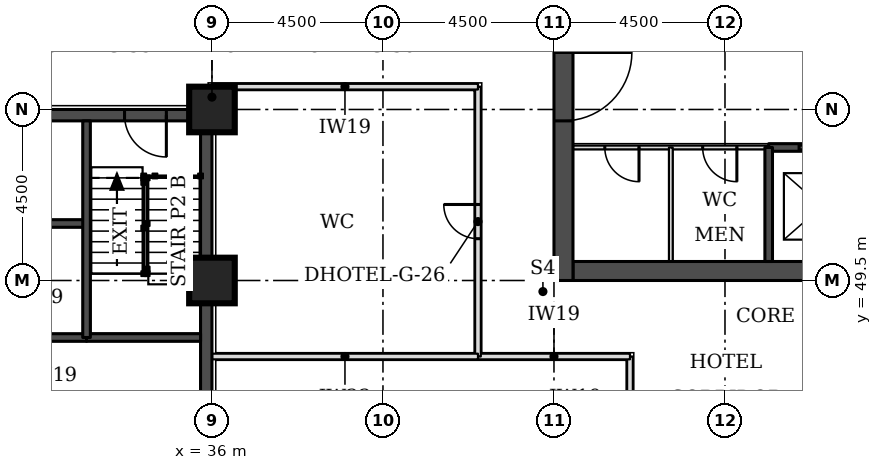
"""IFC4 building model, lengths in metres.
Left out: names, types, materials, properties, quantities, classifications, styles, units other than length and angle.
Written with IfcOpenShell. Run it as: python <this file> out.ifc"""

import sys

from ifc_helpers import new_model, si_unit, direction, frame, frame_2d, origin, origin_2d, place, context, subcontext, project, spatial, rectangle, extrude, element, fill, save


model = new_model("IFC4")
c1 = context("Model", 3, precision=1e-05, world=origin(), true_north=direction((0.0, 1.0)))
c2 = subcontext(c1, "Body", "Model", "MODEL_VIEW")
j1 = project(units=[si_unit("LENGTHUNIT", "METRE"), si_unit("PLANEANGLEUNIT", "RADIAN")], contexts=[c1])
p1 = place(None, origin())
s1 = spatial("IfcSite", under=j1, at=p1, CompositionType="ELEMENT")
p2 = place(p1, origin())
s2 = spatial("IfcBuilding", under=s1, at=p2, CompositionType="ELEMENT")
p3 = place(p2, frame((0.0, 0.0, 66.0)))
s3 = spatial("IfcBuildingStorey", under=s2, at=p3, CompositionType="ELEMENT", Elevation=66.0)
for number, where, z_axis, x_axis in (
    (1, (36.0, 49.5, 0.0), (0.0, 0.0, 1.0), (1.0, 0.0, 0.0)),
    (2, (36.0, 54.0, 0.0), (0.0, 0.0, 1.0), (1.0, 0.0, 0.0)),
):
    element("IfcColumn", number, at=place(p3, frame(where, z_axis=z_axis, x_axis=x_axis)), inside=s3, PredefinedType="COLUMN", context=c2, shape_type="SweptSolid", body=[
        extrude(rectangle(XDim=1.2, YDim=1.2, at=origin_2d()), origin(), (0.0, 0.0, 1.0), 3.3),
    ])
p4 = place(p3, frame((45.5, 49.75, 0.0), z_axis=(0.0, 0.0, 1.0), x_axis=(1.0, 0.0, 0.0)))
e3 = element("IfcWall", 3, at=p4, inside=s3, PredefinedType="SHEAR", context=c2, shape_type="SweptSolid", body=[
    extrude(rectangle(XDim=21.5, YDim=0.5, at=frame_2d((10.75, 0.0))), origin(), (0.0, 0.0, 1.0), 3.3),
])
p5 = place(p3, frame((45.25, 49.5, 0.0), z_axis=(0.0, 0.0, 1.0), x_axis=(0.0, 1.0, 0.0)))
e4 = element("IfcWall", 4, at=p5, inside=s3, PredefinedType="SHEAR", context=c2, shape_type="SweptSolid", body=[
    extrude(rectangle(XDim=22.5, YDim=0.5, at=frame_2d((11.25, 0.0))), origin(), (0.0, 0.0, 1.0), 3.3),
])
p6 = place(p5, frame((4.2, 0.0, 0.0)))
e5 = element("IfcOpeningElement", 5, at=p6, cuts=e4, PredefinedType="OPENING", context=c2, shape_type="SweptSolid", body=[
    extrude(rectangle(XDim=1.8, YDim=2.1, at=frame_2d((0.9, 1.05))), frame((0.0, 0.26, 0.0), z_axis=(0.0, -1.0, 0.0), x_axis=(1.0, 0.0, 0.0)), (0.0, 0.0, 1.0), 0.52),
])
p7 = place(p5, frame((6.9, 0.0, 0.0)))
e6 = element("IfcOpeningElement", 6, at=p7, cuts=e4, PredefinedType="OPENING", context=c2, shape_type="SweptSolid", body=[
    extrude(rectangle(XDim=1.1, YDim=2.1, at=frame_2d((0.55, 1.05))), frame((0.0, 0.26, 0.0), z_axis=(0.0, -1.0, 0.0), x_axis=(1.0, 0.0, 0.0)), (0.0, 0.0, 1.0), 0.52),
])
p8 = place(p5, frame((13.6, 0.0, 0.0)))
e7 = element("IfcOpeningElement", 7, at=p8, cuts=e4, PredefinedType="OPENING", context=c2, shape_type="SweptSolid", body=[
    extrude(rectangle(XDim=1.1, YDim=2.1, at=frame_2d((0.55, 1.05))), frame((0.0, 0.26, 0.0), z_axis=(0.0, -1.0, 0.0), x_axis=(1.0, 0.0, 0.0)), (0.0, 0.0, 1.0), 0.52),
])
p9 = place(p5, frame((16.5, 0.0, 0.0)))
e8 = element("IfcOpeningElement", 8, at=p9, cuts=e4, PredefinedType="OPENING", context=c2, shape_type="SweptSolid", body=[
    extrude(rectangle(XDim=1.8, YDim=2.1, at=frame_2d((0.9, 1.05))), frame((0.0, 0.26, 0.0), z_axis=(0.0, -1.0, 0.0), x_axis=(1.0, 0.0, 0.0)), (0.0, 0.0, 1.0), 0.52),
])
p10 = place(p3, frame((27.3, 53.85, 0.0), z_axis=(0.0, 0.0, 1.0), x_axis=(1.0, 0.0, 0.0)))
e9 = element("IfcWall", 9, at=p10, inside=s3, PredefinedType="SHEAR", context=c2, shape_type="SweptSolid", body=[
    extrude(rectangle(XDim=8.4, YDim=0.3, at=frame_2d((4.2, 0.0))), origin(), (0.0, 0.0, 1.0), 3.3),
])
p11 = place(p10, frame((6.4, 0.0, 0.0)))
e10 = element("IfcOpeningElement", 10, at=p11, cuts=e9, PredefinedType="OPENING", context=c2, shape_type="SweptSolid", body=[
    extrude(rectangle(XDim=1.1, YDim=2.1, at=frame_2d((0.55, 1.05))), frame((0.0, 0.16, 0.0), z_axis=(0.0, -1.0, 0.0), x_axis=(1.0, 0.0, 0.0)), (0.0, 0.0, 1.0), 0.32),
])
p12 = place(p3, frame((35.85, 45.0, 0.0), z_axis=(0.0, 0.0, 1.0), x_axis=(0.0, 1.0, 0.0)))
e11 = element("IfcWall", 11, at=p12, inside=s3, PredefinedType="SHEAR", context=c2, shape_type="SweptSolid", body=[
    extrude(rectangle(XDim=9.0, YDim=0.3, at=frame_2d((4.5, 0.0))), origin(), (0.0, 0.0, 1.0), 3.3),
])
p13 = place(p3, frame((47.0, 40.5, 0.0), z_axis=(0.0, 0.0, 1.0), x_axis=(0.0, 1.0, 0.0)))
e12 = element("IfcWall", 12, at=p13, inside=s3, PredefinedType="PARTITIONING", context=c2, shape_type="SweptSolid", body=[
    extrude(rectangle(XDim=7.0, YDim=0.15, at=frame_2d((3.5, 0.0))), origin(), (0.0, 0.0, 1.0), 3.08),
])
p14 = place(p13, frame((3.05, 0.0, 0.0)))
e13 = element("IfcOpeningElement", 13, at=p14, cuts=e12, PredefinedType="OPENING", context=c2, shape_type="SweptSolid", body=[
    extrude(rectangle(XDim=0.9, YDim=2.1, at=frame_2d((0.45, 1.05))), frame((0.0, 0.085, 0.0), z_axis=(0.0, -1.0, 0.0), x_axis=(1.0, 0.0, 0.0)), (0.0, 0.0, 1.0), 0.17),
])
p15 = place(p3, frame((43.0, 47.5, 0.0), z_axis=(0.0, 0.0, 1.0), x_axis=(1.0, 0.0, 0.0)))
e14 = element("IfcWall", 14, at=p15, inside=s3, PredefinedType="PARTITIONING", context=c2, shape_type="SweptSolid", body=[
    extrude(rectangle(XDim=4.0, YDim=0.15, at=frame_2d((2.0, 0.0))), origin(), (0.0, 0.0, 1.0), 3.08),
])
p16 = place(p3, frame((43.0, 47.5, 0.0), z_axis=(0.0, 0.0, 1.0), x_axis=(0.0, 1.0, 0.0)))
e15 = element("IfcWall", 15, at=p16, inside=s3, PredefinedType="PARTITIONING", context=c2, shape_type="SweptSolid", body=[
    extrude(rectangle(XDim=7.1, YDim=0.15, at=frame_2d((3.55, 0.0))), origin(), (0.0, 0.0, 1.0), 3.08),
])
p17 = place(p16, frame((3.1, 0.0, 0.0)))
e16 = element("IfcOpeningElement", 16, at=p17, cuts=e15, PredefinedType="OPENING", context=c2, shape_type="SweptSolid", body=[
    extrude(rectangle(XDim=0.9, YDim=2.1, at=frame_2d((0.45, 1.05))), frame((0.0, 0.085, 0.0), z_axis=(0.0, -1.0, 0.0), x_axis=(1.0, 0.0, 0.0)), (0.0, 0.0, 1.0), 0.17),
])
p18 = place(p3, frame((36.0, 54.05, 0.0), z_axis=(0.0, 0.0, 1.0), x_axis=(0.0, 1.0, 0.0)))
e17 = element("IfcWall", 17, at=p18, inside=s3, PredefinedType="PARTITIONING", context=c2, shape_type="SweptSolid", body=[
    extrude(rectangle(XDim=0.55, YDim=0.15, at=frame_2d((0.275, 0.0))), origin(), (0.0, 0.0, 1.0), 3.08),
])
for number, where, z_axis, x_axis in (
    (18, (36.0, 54.6, 0.0), (0.0, 0.0, 1.0), (1.0, 0.0, 0.0)),
    (19, (36.0, 47.5, 0.0), (0.0, 0.0, 1.0), (1.0, 0.0, 0.0)),
):
    element("IfcWall", number, at=place(p3, frame(where, z_axis=z_axis, x_axis=x_axis)), inside=s3, PredefinedType="PARTITIONING", context=c2, shape_type="SweptSolid", body=[
        extrude(rectangle(XDim=7.0, YDim=0.15, at=frame_2d((3.5, 0.0))), origin(), (0.0, 0.0, 1.0), 3.08),
    ])
p19 = place(p3, frame((45.5, 53.0, 0.0), z_axis=(0.0, 0.0, 1.0), x_axis=(1.0, 0.0, 0.0)))
e20 = element("IfcWall", 20, at=p19, inside=s3, PredefinedType="PARTITIONING", context=c2, shape_type="SweptSolid", body=[
    extrude(rectangle(XDim=5.15, YDim=0.1, at=frame_2d((2.575, 0.0))), origin(), (0.0, 0.0, 1.0), 3.08),
])
p20 = place(p19, frame((0.837, 0.0, 0.0)))
e21 = element("IfcOpeningElement", 21, at=p20, cuts=e20, PredefinedType="OPENING", context=c2, shape_type="SweptSolid", body=[
    extrude(rectangle(XDim=0.9, YDim=2.1, at=frame_2d((0.45, 1.05))), frame((0.0, 0.06, 0.0), z_axis=(0.0, -1.0, 0.0), x_axis=(1.0, 0.0, 0.0)), (0.0, 0.0, 1.0), 0.12),
])
p21 = place(p19, frame((3.413, 0.0, 0.0)))
e22 = element("IfcOpeningElement", 22, at=p21, cuts=e20, PredefinedType="OPENING", context=c2, shape_type="SweptSolid", body=[
    extrude(rectangle(XDim=0.9, YDim=2.1, at=frame_2d((0.45, 1.05))), frame((0.0, 0.06, 0.0), z_axis=(0.0, -1.0, 0.0), x_axis=(1.0, 0.0, 0.0)), (0.0, 0.0, 1.0), 0.12),
])
p22 = place(p3, frame((50.65, 53.0, 0.0), z_axis=(0.0, 0.0, 1.0), x_axis=(1.0, 0.0, 0.0)))
e23 = element("IfcWall", 23, at=p22, inside=s3, PredefinedType="SOLIDWALL", context=c2, shape_type="SweptSolid", body=[
    extrude(rectangle(XDim=11.2, YDim=0.2, at=frame_2d((5.6, 0.0))), origin(), (0.0, 0.0, 1.0), 3.08),
])
p23 = place(p22, frame((0.8, 0.0, 0.0)))
e24 = element("IfcOpeningElement", 24, at=p23, cuts=e23, PredefinedType="OPENING", context=c2, shape_type="SweptSolid", body=[
    extrude(rectangle(XDim=1.2, YDim=2.1, at=frame_2d((0.6, 1.05))), frame((0.0, 0.11, 0.0), z_axis=(0.0, -1.0, 0.0), x_axis=(1.0, 0.0, 0.0)), (0.0, 0.0, 1.0), 0.22),
])
p24 = place(p22, frame((3.6, 0.0, 0.0)))
e25 = element("IfcOpeningElement", 25, at=p24, cuts=e23, PredefinedType="OPENING", context=c2, shape_type="SweptSolid", body=[
    extrude(rectangle(XDim=1.2, YDim=2.1, at=frame_2d((0.6, 1.05))), frame((0.0, 0.11, 0.0), z_axis=(0.0, -1.0, 0.0), x_axis=(1.0, 0.0, 0.0)), (0.0, 0.0, 1.0), 0.22),
])
p25 = place(p22, frame((6.4, 0.0, 0.0)))
e26 = element("IfcOpeningElement", 26, at=p25, cuts=e23, PredefinedType="OPENING", context=c2, shape_type="SweptSolid", body=[
    extrude(rectangle(XDim=1.2, YDim=2.1, at=frame_2d((0.6, 1.05))), frame((0.0, 0.11, 0.0), z_axis=(0.0, -1.0, 0.0), x_axis=(1.0, 0.0, 0.0)), (0.0, 0.0, 1.0), 0.22),
])
p26 = place(p22, frame((9.2, 0.0, 0.0)))
e27 = element("IfcOpeningElement", 27, at=p26, cuts=e23, PredefinedType="OPENING", context=c2, shape_type="SweptSolid", body=[
    extrude(rectangle(XDim=1.2, YDim=2.1, at=frame_2d((0.6, 1.05))), frame((0.0, 0.11, 0.0), z_axis=(0.0, -1.0, 0.0), x_axis=(1.0, 0.0, 0.0)), (0.0, 0.0, 1.0), 0.22),
])
p27 = place(p3, frame((48.075, 50.0, 0.0), z_axis=(0.0, 0.0, 1.0), x_axis=(0.0, 1.0, 0.0)))
e28 = element("IfcWall", 28, at=p27, inside=s3, PredefinedType="PARTITIONING", context=c2, shape_type="SweptSolid", body=[
    extrude(rectangle(XDim=3.0, YDim=0.1, at=frame_2d((1.5, 0.0))), origin(), (0.0, 0.0, 1.0), 3.08),
])
p28 = place(p3, frame((50.65, 50.0, 0.0), z_axis=(0.0, 0.0, 1.0), x_axis=(0.0, 1.0, 0.0)))
e29 = element("IfcWall", 29, at=p28, inside=s3, PredefinedType="SOLIDWALL", context=c2, shape_type="SweptSolid", body=[
    extrude(rectangle(XDim=3.0, YDim=0.2, at=frame_2d((1.5, 0.0))), origin(), (0.0, 0.0, 1.0), 3.08),
])
p29 = place(p3, frame((30.3, 48.0, 0.0), z_axis=(0.0, 0.0, 1.0), x_axis=(1.0, 0.0, 0.0)))
e30 = element("IfcWall", 30, at=p29, inside=s3, PredefinedType="SOLIDWALL", context=c2, shape_type="SweptSolid", body=[
    extrude(rectangle(XDim=2.4, YDim=0.2, at=frame_2d((1.2, 0.0))), origin(), (0.0, 0.0, 1.0), 3.08),
])
p30 = place(p3, frame((32.7, 48.0, 0.0), z_axis=(0.0, 0.0, 1.0), x_axis=(1.0, 0.0, 0.0)))
e31 = element("IfcWall", 31, at=p30, inside=s3, PredefinedType="SOLIDWALL", context=c2, shape_type="SweptSolid", body=[
    extrude(rectangle(XDim=3.0, YDim=0.2, at=frame_2d((1.5, 0.0))), origin(), (0.0, 0.0, 1.0), 3.08),
])
p31 = place(p3, frame((30.3, 51.0, 0.0), z_axis=(0.0, 0.0, 1.0), x_axis=(1.0, 0.0, 0.0)))
e32 = element("IfcWall", 32, at=p31, inside=s3, PredefinedType="SOLIDWALL", context=c2, shape_type="SweptSolid", body=[
    extrude(rectangle(XDim=2.4, YDim=0.2, at=frame_2d((1.2, 0.0))), origin(), (0.0, 0.0, 1.0), 3.3),
])
p32 = place(p3, frame((32.7, 48.0, 0.0), z_axis=(0.0, 0.0, 1.0), x_axis=(0.0, 1.0, 0.0)))
e33 = element("IfcWall", 33, at=p32, inside=s3, PredefinedType="SOLIDWALL", context=c2, shape_type="SweptSolid", body=[
    extrude(rectangle(XDim=5.7, YDim=0.2, at=frame_2d((2.85, 0.0))), origin(), (0.0, 0.0, 1.0), 3.08),
])
p33 = place(p17, origin())
e34 = element("IfcDoor", 34, at=p33, inside=s3, OperationType="SINGLE_SWING_RIGHT", PredefinedType="DOOR", context=c2, shape_type="SweptSolid", body=[
    extrude(rectangle(XDim=0.9, YDim=2.1, at=frame_2d((0.45, 1.05))), frame((0.0, 0.025, 0.0), z_axis=(0.0, -1.0, 0.0), x_axis=(1.0, 0.0, 0.0)), (0.0, 0.0, 1.0), 0.05),
])
fill(e16, e34)
p34 = place(p23, origin())
e35 = element("IfcDoor", 35, at=p34, inside=s3, OperationType="DOUBLE_DOOR_SLIDING", PredefinedType="DOOR", context=c2, shape_type="SweptSolid", body=[
    extrude(rectangle(XDim=1.2, YDim=2.1, at=frame_2d((0.6, 1.05))), frame((0.0, 0.025, 0.0), z_axis=(0.0, -1.0, 0.0), x_axis=(1.0, 0.0, 0.0)), (0.0, 0.0, 1.0), 0.05),
])
fill(e24, e35)
p35 = place(p6, frame((1.8, 0.0, 0.0), z_axis=(0.0, 0.0, 1.0), x_axis=(-1.0, 0.0, 0.0)))
e36 = element("IfcDoor", 36, at=p35, inside=s3, OperationType="SINGLE_SWING_LEFT", PredefinedType="DOOR", context=c2, shape_type="SweptSolid", body=[
    extrude(rectangle(XDim=1.8, YDim=2.1, at=frame_2d((0.9, 1.05))), frame((0.0, 0.025, 0.0), z_axis=(0.0, -1.0, 0.0), x_axis=(1.0, 0.0, 0.0)), (0.0, 0.0, 1.0), 0.05),
])
fill(e5, e36)
p36 = place(p20, frame((0.9, 0.0, 0.0), z_axis=(0.0, 0.0, 1.0), x_axis=(-1.0, 0.0, 0.0)))
e37 = element("IfcDoor", 37, at=p36, inside=s3, OperationType="SINGLE_SWING_LEFT", PredefinedType="DOOR", context=c2, shape_type="SweptSolid", body=[
    extrude(rectangle(XDim=0.9, YDim=2.1, at=frame_2d((0.45, 1.05))), frame((0.0, 0.025, 0.0), z_axis=(0.0, -1.0, 0.0), x_axis=(1.0, 0.0, 0.0)), (0.0, 0.0, 1.0), 0.05),
])
fill(e21, e37)
p37 = place(p21, frame((0.9, 0.0, 0.0), z_axis=(0.0, 0.0, 1.0), x_axis=(-1.0, 0.0, 0.0)))
e38 = element("IfcDoor", 38, at=p37, inside=s3, OperationType="SINGLE_SWING_LEFT", PredefinedType="DOOR", context=c2, shape_type="SweptSolid", body=[
    extrude(rectangle(XDim=0.9, YDim=2.1, at=frame_2d((0.45, 1.05))), frame((0.0, 0.025, 0.0), z_axis=(0.0, -1.0, 0.0), x_axis=(1.0, 0.0, 0.0)), (0.0, 0.0, 1.0), 0.05),
])
fill(e22, e38)
p38 = place(p11, frame((1.1, 0.0, 0.0), z_axis=(0.0, 0.0, 1.0), x_axis=(-1.0, 0.0, 0.0)))
e39 = element("IfcDoor", 39, at=p38, inside=s3, OperationType="SINGLE_SWING_LEFT", PredefinedType="DOOR", context=c2, shape_type="SweptSolid", body=[
    extrude(rectangle(XDim=1.1, YDim=2.1, at=frame_2d((0.55, 1.05))), frame((0.0, 0.025, 0.0), z_axis=(0.0, -1.0, 0.0), x_axis=(1.0, 0.0, 0.0)), (0.0, 0.0, 1.0), 0.05),
])
fill(e10, e39)
save(model, sys.argv[1])
